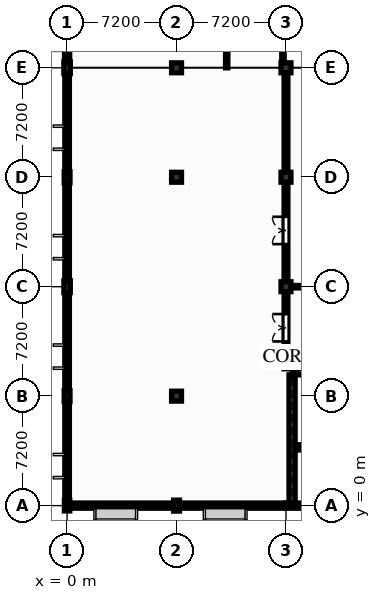
"""IFC4 building model, lengths in metres.
Left out: names, types, materials, properties, quantities, classifications, styles, units other than length and angle.
Written with IfcOpenShell. Run it as: python <this file> out.ifc"""

import sys

from ifc_helpers import new_model, si_unit, direction, frame, frame_2d, origin, origin_with_axes, origin_2d, place, context, subcontext, project, spatial, rectangle, extrude, element, fill, save


model = new_model("IFC4")
c1 = context("Model", 3, precision=1e-05, world=origin(), true_north=direction((0.0, 1.0)))
c2 = subcontext(c1, "Body", "Model", "MODEL_VIEW")
j1 = project(units=[si_unit("LENGTHUNIT", "METRE"), si_unit("PLANEANGLEUNIT", "RADIAN")], contexts=[c1])
p1 = place(None, origin())
s1 = spatial("IfcSite", under=j1, at=p1, CompositionType="ELEMENT")
p2 = place(p1, origin())
s2 = spatial("IfcBuilding", under=s1, at=p2, CompositionType="ELEMENT")
p3 = place(p2, frame((0.0, 0.0, 5.1)))
s3 = spatial("IfcBuildingStorey", under=s2, at=p3, CompositionType="ELEMENT", Elevation=5.1)
p4 = place(p3, frame((0.0, 0.0, 0.0), z_axis=(0.0, 0.0, 1.0), x_axis=(0.0, 1.0, 0.0)))
e1 = element("IfcColumn", 1, at=p4, inside=s3, PredefinedType="PILASTER", context=c2, shape_type="SweptSolid", body=[
    extrude(rectangle(XDim=0.35, YDim=0.7, at=origin_2d()), origin(), (0.0, 0.0, 1.0), 3.84),
])
p5 = place(p3, frame((0.0, 7.2, 0.0), z_axis=(0.0, 0.0, 1.0), x_axis=(1.0, 0.0, 0.0)))
e2 = element("IfcColumn", 2, at=p5, inside=s3, PredefinedType="PILASTER", context=c2, shape_type="SweptSolid", body=[
    extrude(rectangle(XDim=0.38, YDim=0.72, at=origin_2d()), origin(), (0.0, 0.0, 1.0), 3.84),
])
p6 = place(p3, frame((0.0, 14.4, 0.0), z_axis=(0.0, 0.0, 1.0), x_axis=(1.0, 0.0, 0.0)))
e3 = element("IfcColumn", 3, at=p6, inside=s3, PredefinedType="PILASTER", context=c2, shape_type="SweptSolid", body=[
    extrude(rectangle(XDim=0.42, YDim=0.78, at=origin_2d()), origin(), (0.0, 0.0, 1.0), 3.84),
])
p7 = place(p3, frame((0.0, 21.6, 0.0), z_axis=(0.0, 0.0, 1.0), x_axis=(1.0, 0.0, 0.0)))
e4 = element("IfcColumn", 4, at=p7, inside=s3, PredefinedType="PILASTER", context=c2, shape_type="SweptSolid", body=[
    extrude(rectangle(XDim=0.38, YDim=0.72, at=origin_2d()), origin(), (0.0, 0.0, 1.0), 3.84),
])
p8 = place(p3, frame((0.0, 28.8, 0.0), z_axis=(0.0, 0.0, 1.0), x_axis=(1.0, 0.0, 0.0)))
e5 = element("IfcColumn", 5, at=p8, inside=s3, PredefinedType="PILASTER", context=c2, shape_type="SweptSolid", body=[
    extrude(rectangle(XDim=0.42, YDim=0.78, at=origin_2d()), origin(), (0.0, 0.0, 1.0), 3.84),
])
p9 = place(p3, frame((7.2, 0.0, 0.0), z_axis=(0.0, 0.0, 1.0), x_axis=(0.0, 1.0, 0.0)))
e6 = element("IfcColumn", 6, at=p9, inside=s3, PredefinedType="PILASTER", context=c2, shape_type="SweptSolid", body=[
    extrude(rectangle(XDim=0.38, YDim=0.72, at=origin_2d()), origin(), (0.0, 0.0, 1.0), 3.84),
])
for number, where, z_axis, x_axis in (
    (7, (7.2, 7.2, 0.0), (0.0, 0.0, 1.0), (1.0, 0.0, 0.0)),
    (8, (7.2, 21.6, 0.0), (0.0, 0.0, 1.0), (1.0, 0.0, 0.0)),
    (9, (7.2, 28.8, 0.0), (0.0, 0.0, 1.0), (1.0, 0.0, 0.0)),
    (10, (14.4, 14.4, 0.0), (0.0, 0.0, 1.0), (1.0, 0.0, 0.0)),
    (11, (14.4, 21.6, 0.0), (0.0, 0.0, 1.0), (1.0, 0.0, 0.0)),
    (12, (14.4, 28.8, 0.0), (0.0, 0.0, 1.0), (1.0, 0.0, 0.0)),
):
    element("IfcColumn", number, at=place(p3, frame(where, z_axis=z_axis, x_axis=x_axis)), inside=s3, PredefinedType="COLUMN", context=c2, shape_type="SweptSolid", body=[
        extrude(rectangle(XDim=0.65, YDim=0.65, at=origin_2d()), origin(), (0.0, 0.0, 1.0), 3.84),
    ])
p10 = place(p3, frame((0.0, 28.8, 0.0), z_axis=(0.0, 0.0, 1.0), x_axis=(0.0, 1.0, 0.0)))
e13 = element("IfcWall", 13, at=p10, inside=s3, PredefinedType="SOLIDWALL", context=c2, shape_type="SweptSolid", body=[
    extrude(rectangle(XDim=7.2, YDim=0.34, at=frame_2d((3.6, 0.0))), origin(), (0.0, 0.0, 1.0), 3.55),
])
p11 = place(p10, frame((1.5, 0.0, 0.85)))
e14 = element("IfcOpeningElement", 14, at=p11, cuts=e13, PredefinedType="OPENING", context=c2, shape_type="SweptSolid", body=[
    extrude(rectangle(XDim=1.75, YDim=2.15, at=frame_2d((0.875, 1.075))), frame((0.0, 0.18, 0.0), z_axis=(0.0, -1.0, 0.0), x_axis=(1.0, 0.0, 0.0)), (0.0, 0.0, 1.0), 0.36),
])
p12 = place(p10, frame((4.3, 0.0, 0.828)))
e15 = element("IfcOpeningElement", 15, at=p12, cuts=e13, PredefinedType="OPENING", context=c2, shape_type="SweptSolid", body=[
    extrude(rectangle(XDim=2.1, YDim=2.25, at=frame_2d((1.05, 1.125))), frame((0.0, 0.18, 0.0), z_axis=(0.0, -1.0, 0.0), x_axis=(1.0, 0.0, 0.0)), (0.0, 0.0, 1.0), 0.36),
])
p13 = place(p3, origin_with_axes())
e16 = element("IfcWall", 16, at=p13, inside=s3, PredefinedType="SOLIDWALL", context=c2, shape_type="SweptSolid", body=[
    extrude(rectangle(XDim=7.2, YDim=0.34, at=frame_2d((3.6, 0.0))), origin(), (0.0, 0.0, 1.0), 3.55),
])
p14 = place(p13, frame((2.0, 0.0, 0.435)))
e17 = element("IfcOpeningElement", 17, at=p14, cuts=e16, PredefinedType="OPENING", context=c2, shape_type="SweptSolid", body=[
    extrude(rectangle(XDim=2.4, YDim=2.4, at=frame_2d((1.2, 1.2))), frame((0.0, 0.18, 0.0), z_axis=(0.0, -1.0, 0.0), x_axis=(1.0, 0.0, 0.0)), (0.0, 0.0, 1.0), 0.36),
])
p15 = place(p3, frame((7.2, 0.0, 0.0), z_axis=(0.0, 0.0, 1.0), x_axis=(1.0, 0.0, 0.0)))
e18 = element("IfcWall", 18, at=p15, inside=s3, PredefinedType="SOLIDWALL", context=c2, shape_type="SweptSolid", body=[
    extrude(rectangle(XDim=7.2, YDim=0.34, at=frame_2d((3.6, 0.0))), origin(), (0.0, 0.0, 1.0), 3.55),
])
p16 = place(p15, frame((2.0, 0.0, 0.85)))
e19 = element("IfcOpeningElement", 19, at=p16, cuts=e18, PredefinedType="OPENING", context=c2, shape_type="SweptSolid", body=[
    extrude(rectangle(XDim=2.4, YDim=2.4, at=frame_2d((1.2, 1.2))), frame((0.0, 0.18, 0.0), z_axis=(0.0, -1.0, 0.0), x_axis=(1.0, 0.0, 0.0)), (0.0, 0.0, 1.0), 0.36),
])
p17 = place(p3, frame((14.4, 0.0, 0.0), z_axis=(0.0, 0.0, 1.0), x_axis=(1.0, 0.0, 0.0)))
e20 = element("IfcWall", 20, at=p17, inside=s3, PredefinedType="SOLIDWALL", context=c2, shape_type="SweptSolid", body=[
    extrude(rectangle(XDim=7.2, YDim=0.34, at=frame_2d((3.6, 0.0))), origin(), (0.0, 0.0, 1.0), 3.55),
])
p18 = place(p17, frame((5.2, 0.0, 1.05)))
e21 = element("IfcOpeningElement", 21, at=p18, cuts=e20, PredefinedType="OPENING", context=c2, shape_type="SweptSolid", body=[
    extrude(rectangle(XDim=1.05, YDim=1.75, at=frame_2d((0.525, 0.875))), frame((0.0, 0.18, 0.0), z_axis=(0.0, -1.0, 0.0), x_axis=(1.0, 0.0, 0.0)), (0.0, 0.0, 1.0), 0.36),
])
p19 = place(p3, frame((0.0, 0.0, 0.0), z_axis=(0.0, 0.0, 1.0), x_axis=(0.0, 1.0, 0.0)))
e22 = element("IfcWall", 22, at=p19, inside=s3, PredefinedType="SOLIDWALL", context=c2, shape_type="SweptSolid", body=[
    extrude(rectangle(XDim=7.2, YDim=0.3, at=frame_2d((3.6, 0.0))), origin(), (0.0, 0.0, 1.0), 2.875),
])
p20 = place(p19, frame((2.0, 0.0, 0.655)))
e23 = element("IfcOpeningElement", 23, at=p20, cuts=e22, PredefinedType="OPENING", context=c2, shape_type="SweptSolid", body=[
    extrude(rectangle(XDim=1.2, YDim=2.1, at=frame_2d((0.6, 1.05))), frame((0.0, 0.16, 0.0), z_axis=(0.0, -1.0, 0.0), x_axis=(1.0, 0.0, 0.0)), (0.0, 0.0, 1.0), 0.32),
])
p21 = place(p3, frame((0.0, 7.2, 0.0), z_axis=(0.0, 0.0, 1.0), x_axis=(0.0, 1.0, 0.0)))
e24 = element("IfcWall", 24, at=p21, inside=s3, PredefinedType="SOLIDWALL", context=c2, shape_type="SweptSolid", body=[
    extrude(rectangle(XDim=7.2, YDim=0.3, at=frame_2d((3.6, 0.0))), origin(), (0.0, 0.0, 1.0), 2.875),
])
p22 = place(p21, frame((2.0, 0.0, 0.655)))
e25 = element("IfcOpeningElement", 25, at=p22, cuts=e24, PredefinedType="OPENING", context=c2, shape_type="SweptSolid", body=[
    extrude(rectangle(XDim=1.2, YDim=2.1, at=frame_2d((0.6, 1.05))), frame((0.0, 0.16, 0.0), z_axis=(0.0, -1.0, 0.0), x_axis=(1.0, 0.0, 0.0)), (0.0, 0.0, 1.0), 0.32),
])
p23 = place(p3, frame((0.0, 14.4, 0.0), z_axis=(0.0, 0.0, 1.0), x_axis=(0.0, 1.0, 0.0)))
e26 = element("IfcWall", 26, at=p23, inside=s3, PredefinedType="SOLIDWALL", context=c2, shape_type="SweptSolid", body=[
    extrude(rectangle(XDim=7.2, YDim=0.3, at=frame_2d((3.6, 0.0))), origin(), (0.0, 0.0, 1.0), 2.875),
])
p24 = place(p23, frame((2.0, 0.0, 0.655)))
e27 = element("IfcOpeningElement", 27, at=p24, cuts=e26, PredefinedType="OPENING", context=c2, shape_type="SweptSolid", body=[
    extrude(rectangle(XDim=1.2, YDim=2.1, at=frame_2d((0.6, 1.05))), frame((0.0, 0.16, 0.0), z_axis=(0.0, -1.0, 0.0), x_axis=(1.0, 0.0, 0.0)), (0.0, 0.0, 1.0), 0.32),
])
p25 = place(p3, frame((0.0, 21.6, 0.0), z_axis=(0.0, 0.0, 1.0), x_axis=(0.0, 1.0, 0.0)))
e28 = element("IfcWall", 28, at=p25, inside=s3, PredefinedType="SOLIDWALL", context=c2, shape_type="SweptSolid", body=[
    extrude(rectangle(XDim=7.2, YDim=0.3, at=frame_2d((3.6, 0.0))), origin(), (0.0, 0.0, 1.0), 2.905),
])
p26 = place(p25, frame((2.0, 0.0, 0.685)))
e29 = element("IfcOpeningElement", 29, at=p26, cuts=e28, PredefinedType="OPENING", context=c2, shape_type="SweptSolid", body=[
    extrude(rectangle(XDim=1.2, YDim=2.1, at=frame_2d((0.6, 1.05))), frame((0.0, 0.16, 0.0), z_axis=(0.0, -1.0, 0.0), x_axis=(1.0, 0.0, 0.0)), (0.0, 0.0, 1.0), 0.32),
])
p27 = place(p3, frame((14.8, 8.8, 0.0), z_axis=(0.0, 0.0, 1.0), x_axis=(1.0, 0.0, 0.0)))
e30 = element("IfcWall", 30, at=p27, inside=s3, PredefinedType="SHEAR", context=c2, shape_type="SweptSolid", body=[
    extrude(rectangle(XDim=10.4, YDim=0.4, at=frame_2d((5.2, 0.0))), origin(), (0.0, 0.0, 1.0), 3.55),
])
p28 = place(p27, frame((2.4, 0.0, 0.0)))
e31 = element("IfcOpeningElement", 31, at=p28, cuts=e30, PredefinedType="OPENING", context=c2, shape_type="SweptSolid", body=[
    extrude(rectangle(XDim=1.5, YDim=2.2, at=frame_2d((0.75, 1.1))), frame((0.0, 0.21, 0.0), z_axis=(0.0, -1.0, 0.0), x_axis=(1.0, 0.0, 0.0)), (0.0, 0.0, 1.0), 0.42),
])
p29 = place(p3, frame((14.8, 0.17, 0.0), z_axis=(0.0, 0.0, 1.0), x_axis=(0.0, 1.0, 0.0)))
e32 = element("IfcWall", 32, at=p29, inside=s3, PredefinedType="SHEAR", context=c2, shape_type="SweptSolid", body=[
    extrude(rectangle(XDim=8.43, YDim=0.4, at=frame_2d((4.215, 0.0))), origin(), (0.0, 0.0, 1.0), 3.55),
])
p30 = place(p3, frame((15.0, 3.835, 0.0), z_axis=(0.0, 0.0, 1.0), x_axis=(1.0, 0.0, 0.0)))
e33 = element("IfcWall", 33, at=p30, inside=s3, PredefinedType="SHEAR", context=c2, shape_type="SweptSolid", body=[
    extrude(rectangle(XDim=10.0, YDim=0.35, at=frame_2d((5.0, 0.0))), origin(), (0.0, 0.0, 1.0), 3.55),
])
p31 = place(p30, frame((0.45, 0.0, 0.0)))
e34 = element("IfcOpeningElement", 34, at=p31, cuts=e33, PredefinedType="OPENING", context=c2, shape_type="SweptSolid", body=[
    extrude(rectangle(XDim=1.05, YDim=2.2, at=frame_2d((0.525, 1.1))), frame((0.0, 0.185, 0.0), z_axis=(0.0, -1.0, 0.0), x_axis=(1.0, 0.0, 0.0)), (0.0, 0.0, 1.0), 0.37),
])
p32 = place(p3, frame((14.2, 28.8, 0.0), z_axis=(0.0, 0.0, 1.0), x_axis=(0.0, 1.0, 0.0)))
e35 = element("IfcWall", 35, at=p32, inside=s3, PredefinedType="PARTITIONING", context=c2, shape_type="SweptSolid", body=[
    extrude(rectangle(XDim=14.32, YDim=0.16, at=frame_2d((7.16, 0.0))), origin(), (0.0, 0.0, 1.0), 2.943),
])
p33 = place(p32, frame((4.5, 0.0, 0.0)))
e36 = element("IfcOpeningElement", 36, at=p33, cuts=e35, PredefinedType="OPENING", context=c2, shape_type="SweptSolid", body=[
    extrude(rectangle(XDim=1.6, YDim=2.2, at=frame_2d((0.8, 1.1))), frame((0.0, 0.09, 0.0), z_axis=(0.0, -1.0, 0.0), x_axis=(1.0, 0.0, 0.0)), (0.0, 0.0, 1.0), 0.18),
])
p34 = place(p3, frame((10.5, 28.8, 0.0), z_axis=(0.0, 0.0, 1.0), x_axis=(0.0, 1.0, 0.0)))
e37 = element("IfcWall", 37, at=p34, inside=s3, PredefinedType="PARTITIONING", context=c2, shape_type="SweptSolid", body=[
    extrude(rectangle(XDim=27.2, YDim=0.15, at=frame_2d((13.6, 0.0))), origin(), (0.0, 0.0, 1.0), 3.199),
])
p35 = place(p34, frame((10.0, 0.0, 0.0)))
e38 = element("IfcOpeningElement", 38, at=p35, cuts=e37, PredefinedType="OPENING", context=c2, shape_type="SweptSolid", body=[
    extrude(rectangle(XDim=1.0, YDim=2.15, at=frame_2d((0.5, 1.075))), frame((0.0, 0.085, 0.0), z_axis=(0.0, -1.0, 0.0), x_axis=(1.0, 0.0, 0.0)), (0.0, 0.0, 1.0), 0.17),
])
p36 = place(p3, frame((14.4, 9.0, 0.0), z_axis=(0.0, 0.0, 1.0), x_axis=(0.0, 1.0, 0.0)))
e39 = element("IfcWall", 39, at=p36, inside=s3, PredefinedType="PARTITIONING", context=c2, shape_type="SweptSolid", body=[
    extrude(rectangle(XDim=19.8, YDim=0.25, at=frame_2d((9.9, 0.0))), origin(), (0.0, 0.0, 1.0), 2.755),
])
p37 = place(p36, frame((1.8, 0.0, 0.0)))
e40 = element("IfcOpeningElement", 40, at=p37, cuts=e39, PredefinedType="OPENING", context=c2, shape_type="SweptSolid", body=[
    extrude(rectangle(XDim=1.8, YDim=2.3, at=frame_2d((0.9, 1.15))), frame((0.0, 0.135, 0.0), z_axis=(0.0, -1.0, 0.0), x_axis=(1.0, 0.0, 0.0)), (0.0, 0.0, 1.0), 0.27),
])
p38 = place(p36, frame((8.2, 0.0, 0.0)))
e41 = element("IfcOpeningElement", 41, at=p38, cuts=e39, PredefinedType="OPENING", context=c2, shape_type="SweptSolid", body=[
    extrude(rectangle(XDim=1.8, YDim=2.3, at=frame_2d((0.9, 1.15))), frame((0.0, 0.135, 0.0), z_axis=(0.0, -1.0, 0.0), x_axis=(1.0, 0.0, 0.0)), (0.0, 0.0, 1.0), 0.27),
])
p39 = place(p3, frame((14.6, 14.4, 0.0), z_axis=(0.0, 0.0, 1.0), x_axis=(1.0, 0.0, 0.0)))
e42 = element("IfcWall", 42, at=p39, inside=s3, PredefinedType="PARTITIONING", context=c2, shape_type="SweptSolid", body=[
    extrude(rectangle(XDim=30.4, YDim=0.16, at=frame_2d((15.2, 0.0))), origin(), (0.0, 0.0, 1.0), 2.675),
])
p40 = place(p39, frame((2.8, 0.0, 0.0)))
e43 = element("IfcOpeningElement", 43, at=p40, cuts=e42, PredefinedType="OPENING", context=c2, shape_type="SweptSolid", body=[
    extrude(rectangle(XDim=1.6, YDim=2.2, at=frame_2d((0.8, 1.1))), frame((0.0, 0.09, 0.0), z_axis=(0.0, -1.0, 0.0), x_axis=(1.0, 0.0, 0.0)), (0.0, 0.0, 1.0), 0.18),
])
p41 = place(p39, frame((18.2, 0.0, 0.0)))
e44 = element("IfcOpeningElement", 44, at=p41, cuts=e42, PredefinedType="OPENING", context=c2, shape_type="SweptSolid", body=[
    extrude(rectangle(XDim=1.6, YDim=2.2, at=frame_2d((0.8, 1.1))), frame((0.0, 0.09, 0.0), z_axis=(0.0, -1.0, 0.0), x_axis=(1.0, 0.0, 0.0)), (0.0, 0.0, 1.0), 0.18),
])
p42 = place(p14, origin())
e45 = element("IfcWindow", 45, at=p42, inside=s3, PartitioningType="SINGLE_PANEL", PredefinedType="WINDOW", context=c2, shape_type="SweptSolid", body=[
    extrude(rectangle(XDim=2.4, YDim=2.4, at=frame_2d((1.2, 1.2))), frame((0.0, 0.03, 0.0), z_axis=(0.0, -1.0, 0.0), x_axis=(1.0, 0.0, 0.0)), (0.0, 0.0, 1.0), 0.06),
])
fill(e17, e45)
p43 = place(p16, origin())
e46 = element("IfcWindow", 46, at=p43, inside=s3, PartitioningType="SINGLE_PANEL", PredefinedType="WINDOW", context=c2, shape_type="SweptSolid", body=[
    extrude(rectangle(XDim=2.4, YDim=2.4, at=frame_2d((1.2, 1.2))), frame((0.0, 0.03, 0.0), z_axis=(0.0, -1.0, 0.0), x_axis=(1.0, 0.0, 0.0)), (0.0, 0.0, 1.0), 0.06),
])
fill(e19, e46)
p44 = place(p20, origin())
e47 = element("IfcWindow", 47, at=p44, inside=s3, PartitioningType="SINGLE_PANEL", PredefinedType="WINDOW", context=c2, shape_type="SweptSolid", body=[
    extrude(rectangle(XDim=1.2, YDim=2.1, at=frame_2d((0.6, 1.05))), frame((0.0, 0.03, 0.0), z_axis=(0.0, -1.0, 0.0), x_axis=(1.0, 0.0, 0.0)), (0.0, 0.0, 1.0), 0.06),
])
fill(e23, e47)
p45 = place(p22, origin())
e48 = element("IfcWindow", 48, at=p45, inside=s3, PartitioningType="SINGLE_PANEL", PredefinedType="WINDOW", context=c2, shape_type="SweptSolid", body=[
    extrude(rectangle(XDim=1.2, YDim=2.1, at=frame_2d((0.6, 1.05))), frame((0.0, 0.03, 0.0), z_axis=(0.0, -1.0, 0.0), x_axis=(1.0, 0.0, 0.0)), (0.0, 0.0, 1.0), 0.06),
])
fill(e25, e48)
p46 = place(p24, origin())
e49 = element("IfcWindow", 49, at=p46, inside=s3, PartitioningType="SINGLE_PANEL", PredefinedType="WINDOW", context=c2, shape_type="SweptSolid", body=[
    extrude(rectangle(XDim=1.2, YDim=2.1, at=frame_2d((0.6, 1.05))), frame((0.0, 0.03, 0.0), z_axis=(0.0, -1.0, 0.0), x_axis=(1.0, 0.0, 0.0)), (0.0, 0.0, 1.0), 0.06),
])
fill(e27, e49)
p47 = place(p26, origin())
e50 = element("IfcWindow", 50, at=p47, inside=s3, PartitioningType="SINGLE_PANEL", PredefinedType="WINDOW", context=c2, shape_type="SweptSolid", body=[
    extrude(rectangle(XDim=1.2, YDim=2.1, at=frame_2d((0.6, 1.05))), frame((0.0, 0.03, 0.0), z_axis=(0.0, -1.0, 0.0), x_axis=(1.0, 0.0, 0.0)), (0.0, 0.0, 1.0), 0.06),
])
fill(e29, e50)
p48 = place(p37, origin())
e51 = element("IfcDoor", 51, at=p48, inside=s3, OperationType="DOUBLE_DOOR_SINGLE_SWING", PredefinedType="DOOR", context=c2, shape_type="SweptSolid", body=[
    extrude(rectangle(XDim=1.8, YDim=2.3, at=frame_2d((0.9, 1.15))), frame((0.0, 0.025, 0.0), z_axis=(0.0, -1.0, 0.0), x_axis=(1.0, 0.0, 0.0)), (0.0, 0.0, 1.0), 0.05),
])
fill(e40, e51)
p49 = place(p38, origin())
e52 = element("IfcDoor", 52, at=p49, inside=s3, OperationType="DOUBLE_DOOR_SINGLE_SWING", PredefinedType="DOOR", context=c2, shape_type="SweptSolid", body=[
    extrude(rectangle(XDim=1.8, YDim=2.3, at=frame_2d((0.9, 1.15))), frame((0.0, 0.025, 0.0), z_axis=(0.0, -1.0, 0.0), x_axis=(1.0, 0.0, 0.0)), (0.0, 0.0, 1.0), 0.05),
])
fill(e41, e52)
save(model, sys.argv[1])
